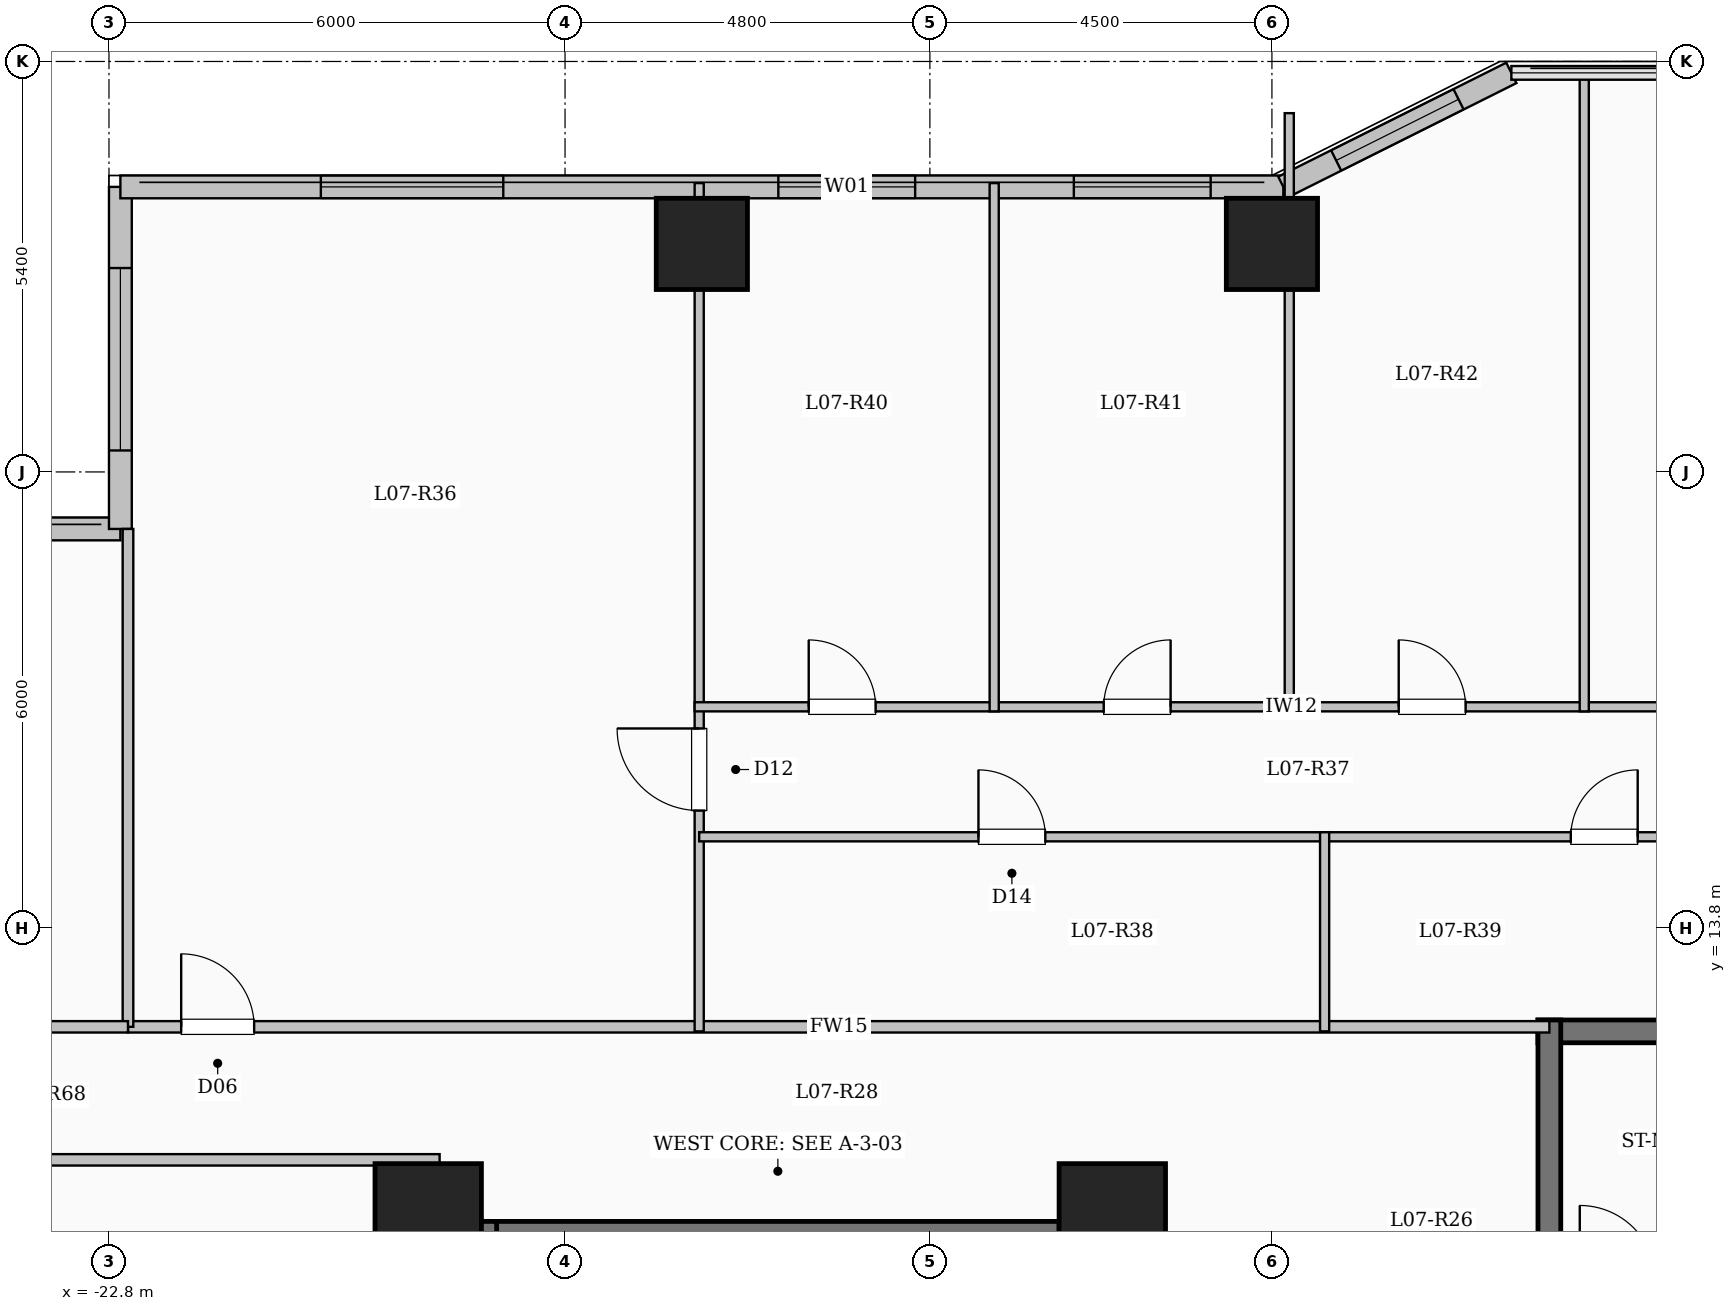
"""IFC4 building model, lengths in metres.
Left out: names, types, materials, properties, quantities, classifications, styles, units other than length and angle.
Written with IfcOpenShell. Run it as: python <this file> out.ifc"""

import sys

from ifc_helpers import new_model, si_unit, direction, frame, frame_2d, origin, origin_2d, place, context, subcontext, project, spatial, rectangle, extrude, element, fill, save


model = new_model("IFC4")
c1 = context("Model", 3, precision=1e-05, world=origin(), true_north=direction((0.0, 1.0)))
c2 = subcontext(c1, "Body", "Model", "MODEL_VIEW")
j1 = project(units=[si_unit("LENGTHUNIT", "METRE"), si_unit("PLANEANGLEUNIT", "RADIAN")], contexts=[c1])
p1 = place(None, origin())
s1 = spatial("IfcSite", under=j1, at=p1, CompositionType="ELEMENT")
p2 = place(p1, origin())
s2 = spatial("IfcBuilding", under=s1, at=p2, CompositionType="ELEMENT")
p3 = place(p2, frame((0.0, 0.0, 30.7)))
s3 = spatial("IfcBuildingStorey", under=s2, at=p3, CompositionType="ELEMENT", Elevation=30.7)
for number, where, z_axis, x_axis in (
    (1, (-9.6, 10.0, 0.0), (0.0, 0.0, 1.0), (1.0, 0.0, 0.0)),
    (2, (-18.6, 10.0, 0.0), (0.0, 0.0, 1.0), (1.0, 0.0, 0.0)),
):
    element("IfcColumn", number, at=place(p3, frame(where, z_axis=z_axis, x_axis=x_axis)), inside=s3, PredefinedType="COLUMN", context=c2, shape_type="SweptSolid", body=[
        extrude(rectangle(XDim=1.4, YDim=1.4, at=origin_2d()), origin(), (0.0, 0.0, 1.0), 3.35),
    ])
for number, where, z_axis, x_axis in (
    (3, (-15.0, 22.8, 0.0), (0.0, 0.0, 1.0), (1.0, 0.0, 0.0)),
    (4, (-7.5, 22.8, 0.0), (0.0, 0.0, 1.0), (1.0, 0.0, 0.0)),
):
    element("IfcColumn", number, at=place(p3, frame(where, z_axis=z_axis, x_axis=x_axis)), inside=s3, PredefinedType="COLUMN", context=c2, shape_type="SweptSolid", body=[
        extrude(rectangle(XDim=1.2, YDim=1.2, at=origin_2d()), origin(), (0.0, 0.0, 1.0), 3.35),
    ])
p4 = place(p3, frame((-28.65, 19.05, 0.0), z_axis=(0.0, 0.0, 1.0), x_axis=(1.0, 0.0, 0.0)))
e5 = element("IfcWall", 5, at=p4, inside=s3, PredefinedType="SOLIDWALL", context=c2, shape_type="SweptSolid", body=[
    extrude(rectangle(XDim=6.0, YDim=0.3, at=frame_2d((3.0, 0.0))), origin(), (0.0, 0.0, 1.0), 3.1),
])
p5 = place(p4, frame((2.025, 0.0, 0.9)))
e6 = element("IfcOpeningElement", 6, at=p5, cuts=e5, PredefinedType="OPENING", context=c2, shape_type="SweptSolid", body=[
    extrude(rectangle(XDim=2.0, YDim=1.7, at=frame_2d((1.0, 0.85))), frame((0.0, 0.16, 0.0), z_axis=(0.0, -1.0, 0.0), x_axis=(1.0, 0.0, 0.0)), (0.0, 0.0, 1.0), 0.32),
])
p6 = place(p3, frame((-22.65, 19.05, 0.0), z_axis=(0.0, 0.0, 1.0), x_axis=(0.0, 1.0, 0.0)))
e7 = element("IfcWall", 7, at=p6, inside=s3, PredefinedType="SOLIDWALL", context=c2, shape_type="SweptSolid", body=[
    extrude(rectangle(XDim=4.5, YDim=0.3, at=frame_2d((2.25, 0.0))), origin(), (0.0, 0.0, 1.0), 3.1),
])
p7 = place(p6, frame((1.032, 0.0, 0.9)))
e8 = element("IfcOpeningElement", 8, at=p7, cuts=e7, PredefinedType="OPENING", context=c2, shape_type="SweptSolid", body=[
    extrude(rectangle(XDim=2.4, YDim=1.8, at=frame_2d((1.2, 0.9))), frame((0.0, 0.16, 0.0), z_axis=(0.0, -1.0, 0.0), x_axis=(1.0, 0.0, 0.0)), (0.0, 0.0, 1.0), 0.32),
])
p8 = place(p3, frame((-22.65, 23.55, 0.0), z_axis=(0.0, 0.0, 1.0), x_axis=(1.0, 0.0, 0.0)))
e9 = element("IfcWall", 9, at=p8, inside=s3, PredefinedType="SOLIDWALL", context=c2, shape_type="SweptSolid", body=[
    extrude(rectangle(XDim=15.3, YDim=0.3, at=frame_2d((7.65, 0.0))), origin(), (0.0, 0.0, 1.0), 3.1),
])
p9 = place(p8, frame((2.637, 0.0, 0.9)))
e10 = element("IfcOpeningElement", 10, at=p9, cuts=e9, PredefinedType="OPENING", context=c2, shape_type="SweptSolid", body=[
    extrude(rectangle(XDim=2.4, YDim=1.8, at=frame_2d((1.2, 0.9))), frame((0.0, 0.16, 0.0), z_axis=(0.0, -1.0, 0.0), x_axis=(1.0, 0.0, 0.0)), (0.0, 0.0, 1.0), 0.32),
])
p10 = place(p8, frame((8.656, 0.0, 0.9)))
e11 = element("IfcOpeningElement", 11, at=p10, cuts=e9, PredefinedType="OPENING", context=c2, shape_type="SweptSolid", body=[
    extrude(rectangle(XDim=1.8, YDim=1.65, at=frame_2d((0.9, 0.825))), frame((0.0, 0.16, 0.0), z_axis=(0.0, -1.0, 0.0), x_axis=(1.0, 0.0, 0.0)), (0.0, 0.0, 1.0), 0.32),
])
p11 = place(p8, frame((12.544, 0.0, 0.9)))
e12 = element("IfcOpeningElement", 12, at=p11, cuts=e9, PredefinedType="OPENING", context=c2, shape_type="SweptSolid", body=[
    extrude(rectangle(XDim=1.8, YDim=1.65, at=frame_2d((0.9, 0.825))), frame((0.0, 0.16, 0.0), z_axis=(0.0, -1.0, 0.0), x_axis=(1.0, 0.0, 0.0)), (0.0, 0.0, 1.0), 0.32),
])
p12 = place(p3, frame((-7.35, 23.55, 0.0), z_axis=(0.0, 0.0, 1.0), x_axis=(0.894427191, 0.4472135955, 0.0)))
e13 = element("IfcWall", 13, at=p12, inside=s3, PredefinedType="SOLIDWALL", context=c2, shape_type="SweptSolid", body=[
    extrude(rectangle(XDim=3.354, YDim=0.3, at=frame_2d((1.677, 0.0))), origin(), (0.0, 0.0, 1.0), 3.1),
])
p13 = place(p12, frame((0.777, 0.0, 0.9)))
e14 = element("IfcOpeningElement", 14, at=p13, cuts=e13, PredefinedType="OPENING", context=c2, shape_type="SweptSolid", body=[
    extrude(rectangle(XDim=1.8, YDim=1.65, at=frame_2d((0.9, 0.825))), frame((0.0, 0.16, 0.0), z_axis=(0.0, -1.0, 0.0), x_axis=(1.0, 0.0, 0.0)), (0.0, 0.0, 1.0), 0.32),
])
p14 = place(p3, frame((-18.0, 9.79, 0.0), z_axis=(0.0, 0.0, 1.0), x_axis=(1.0, 0.0, 0.0)))
e15 = element("IfcWall", 15, at=p14, inside=s3, PredefinedType="SHEAR", context=c2, shape_type="SweptSolid", body=[
    extrude(rectangle(XDim=8.0, YDim=0.3, at=frame_2d((4.0, 0.0))), origin(), (0.0, 0.0, 1.0), 3.35),
])
for number, where, z_axis, x_axis in (
    (16, (-17.85, 6.35, 0.0), (0.0, 0.0, 1.0), (0.0, 1.0, 0.0)),
    (17, (-10.15, 6.35, 0.0), (0.0, 0.0, 1.0), (0.0, 1.0, 0.0)),
):
    element("IfcWall", number, at=place(p3, frame(where, z_axis=z_axis, x_axis=x_axis)), inside=s3, PredefinedType="SHEAR", context=c2, shape_type="SweptSolid", body=[
        extrude(rectangle(XDim=3.59, YDim=0.3, at=frame_2d((1.795, 0.0))), origin(), (0.0, 0.0, 1.0), 3.35),
    ])
p15 = place(p3, frame((-4.0, 12.44, 0.0), z_axis=(0.0, 0.0, 1.0), x_axis=(1.0, 0.0, 0.0)))
e18 = element("IfcWall", 18, at=p15, inside=s3, PredefinedType="SHEAR", context=c2, shape_type="SweptSolid", body=[
    extrude(rectangle(XDim=8.0, YDim=0.3, at=frame_2d((4.0, 0.0))), origin(), (0.0, 0.0, 1.0), 3.35),
])
p16 = place(p3, frame((-3.85, 9.0, 0.0), z_axis=(0.0, 0.0, 1.0), x_axis=(0.0, 1.0, 0.0)))
e19 = element("IfcWall", 19, at=p16, inside=s3, PredefinedType="SHEAR", context=c2, shape_type="SweptSolid", body=[
    extrude(rectangle(XDim=3.59, YDim=0.3, at=frame_2d((1.795, 0.0))), origin(), (0.0, 0.0, 1.0), 3.35),
])
p17 = place(p3, frame((-22.55, 12.5, 0.0), z_axis=(0.0, 0.0, 1.0), x_axis=(1.0, 0.0, 0.0)))
e20 = element("IfcWall", 20, at=p17, inside=s3, PredefinedType="PARTITIONING", context=c2, shape_type="SweptSolid", body=[
    extrude(rectangle(XDim=18.7, YDim=0.15, at=frame_2d((9.35, 0.0))), origin(), (0.0, 0.0, 1.0), 3.1),
])
p18 = place(p17, frame((0.7, 0.0, 0.0)))
e21 = element("IfcOpeningElement", 21, at=p18, cuts=e20, PredefinedType="OPENING", context=c2, shape_type="SweptSolid", body=[
    extrude(rectangle(XDim=0.96, YDim=2.15, at=frame_2d((0.48, 1.075))), frame((0.0, 0.085, 0.0), z_axis=(0.0, -1.0, 0.0), x_axis=(1.0, 0.0, 0.0)), (0.0, 0.0, 1.0), 0.17),
])
p19 = place(p3, frame((-15.035, 12.44, 0.0), z_axis=(0.0, 0.0, 1.0), x_axis=(0.0, 1.0, 0.0)))
e22 = element("IfcWall", 22, at=p19, inside=s3, PredefinedType="PARTITIONING", context=c2, shape_type="SweptSolid", body=[
    extrude(rectangle(XDim=11.16, YDim=0.12, at=frame_2d((5.58, 0.0))), origin(), (0.0, 0.0, 1.0), 2.435),
])
p20 = place(p19, frame((2.905, 0.0, 0.0)))
e23 = element("IfcOpeningElement", 23, at=p20, cuts=e22, PredefinedType="OPENING", context=c2, shape_type="SweptSolid", body=[
    extrude(rectangle(XDim=1.08, YDim=2.15, at=frame_2d((0.54, 1.075))), frame((0.0, 0.07, 0.0), z_axis=(0.0, -1.0, 0.0), x_axis=(1.0, 0.0, 0.0)), (0.0, 0.0, 1.0), 0.14),
])
p21 = place(p3, frame((-15.035, 15.0, 0.0), z_axis=(0.0, 0.0, 1.0), x_axis=(1.0, 0.0, 0.0)))
e24 = element("IfcWall", 24, at=p21, inside=s3, PredefinedType="PARTITIONING", context=c2, shape_type="SweptSolid", body=[
    extrude(rectangle(XDim=8.228, YDim=0.12, at=frame_2d((4.114, 0.0))), origin(), (0.0, 0.0, 1.0), 2.585),
])
p22 = place(p21, frame((3.674, 0.0, 0.0)))
e25 = element("IfcOpeningElement", 25, at=p22, cuts=e24, PredefinedType="OPENING", context=c2, shape_type="SweptSolid", body=[
    extrude(rectangle(XDim=0.88, YDim=2.1, at=frame_2d((0.44, 1.05))), frame((0.0, 0.07, 0.0), z_axis=(0.0, -1.0, 0.0), x_axis=(1.0, 0.0, 0.0)), (0.0, 0.0, 1.0), 0.14),
])
p23 = place(p3, frame((-6.807, 15.0, 0.0), z_axis=(0.0, 0.0, 1.0), x_axis=(1.0, 0.0, 0.0)))
e26 = element("IfcWall", 26, at=p23, inside=s3, PredefinedType="PARTITIONING", context=c2, shape_type="SweptSolid", body=[
    extrude(rectangle(XDim=7.357, YDim=0.12, at=frame_2d((3.678, 0.0))), origin(), (0.0, 0.0, 1.0), 2.585),
])
p24 = place(p23, frame((3.239, 0.0, 0.0)))
e27 = element("IfcOpeningElement", 27, at=p24, cuts=e26, PredefinedType="OPENING", context=c2, shape_type="SweptSolid", body=[
    extrude(rectangle(XDim=0.88, YDim=2.1, at=frame_2d((0.44, 1.05))), frame((0.0, 0.07, 0.0), z_axis=(0.0, -1.0, 0.0), x_axis=(1.0, 0.0, 0.0)), (0.0, 0.0, 1.0), 0.14),
])
p25 = place(p3, frame((-15.095, 16.71, 0.0), z_axis=(0.0, 0.0, 1.0), x_axis=(1.0, 0.0, 0.0)))
e28 = element("IfcWall", 28, at=p25, inside=s3, PredefinedType="PARTITIONING", context=c2, shape_type="SweptSolid", body=[
    extrude(rectangle(XDim=15.705, YDim=0.12, at=frame_2d((7.853, 0.0))), origin(), (0.0, 0.0, 1.0), 2.585),
])
p26 = place(p25, frame((1.501, 0.0, 0.0)))
e29 = element("IfcOpeningElement", 29, at=p26, cuts=e28, PredefinedType="OPENING", context=c2, shape_type="SweptSolid", body=[
    extrude(rectangle(XDim=0.88, YDim=2.1, at=frame_2d((0.44, 1.05))), frame((0.0, 0.07, 0.0), z_axis=(0.0, -1.0, 0.0), x_axis=(1.0, 0.0, 0.0)), (0.0, 0.0, 1.0), 0.14),
])
p27 = place(p25, frame((5.382, 0.0, 0.0)))
e30 = element("IfcOpeningElement", 30, at=p27, cuts=e28, PredefinedType="OPENING", context=c2, shape_type="SweptSolid", body=[
    extrude(rectangle(XDim=0.88, YDim=2.1, at=frame_2d((0.44, 1.05))), frame((0.0, 0.07, 0.0), z_axis=(0.0, -1.0, 0.0), x_axis=(1.0, 0.0, 0.0)), (0.0, 0.0, 1.0), 0.14),
])
p28 = place(p25, frame((9.263, 0.0, 0.0)))
e31 = element("IfcOpeningElement", 31, at=p28, cuts=e28, PredefinedType="OPENING", context=c2, shape_type="SweptSolid", body=[
    extrude(rectangle(XDim=0.88, YDim=2.1, at=frame_2d((0.44, 1.05))), frame((0.0, 0.07, 0.0), z_axis=(0.0, -1.0, 0.0), x_axis=(1.0, 0.0, 0.0)), (0.0, 0.0, 1.0), 0.14),
])
p29 = place(p25, frame((13.144, 0.0, 0.0)))
e32 = element("IfcOpeningElement", 32, at=p29, cuts=e28, PredefinedType="OPENING", context=c2, shape_type="SweptSolid", body=[
    extrude(rectangle(XDim=0.88, YDim=2.1, at=frame_2d((0.44, 1.05))), frame((0.0, 0.07, 0.0), z_axis=(0.0, -1.0, 0.0), x_axis=(1.0, 0.0, 0.0)), (0.0, 0.0, 1.0), 0.14),
])
p30 = place(p3, frame((-6.807, 12.44, 0.0), z_axis=(0.0, 0.0, 1.0), x_axis=(0.0, 1.0, 0.0)))
e33 = element("IfcWall", 33, at=p30, inside=s3, PredefinedType="PARTITIONING", context=c2, shape_type="SweptSolid", body=[
    extrude(rectangle(XDim=2.62, YDim=0.12, at=frame_2d((1.31, 0.0))), origin(), (0.0, 0.0, 1.0), 3.1),
])
p31 = place(p3, frame((-11.154, 16.65, 0.0), z_axis=(0.0, 0.0, 1.0), x_axis=(0.0, 1.0, 0.0)))
e34 = element("IfcWall", 34, at=p31, inside=s3, PredefinedType="PARTITIONING", context=c2, shape_type="SweptSolid", body=[
    extrude(rectangle(XDim=6.95, YDim=0.12, at=frame_2d((3.475, 0.0))), origin(), (0.0, 0.0, 1.0), 3.1),
])
p32 = place(p3, frame((-7.272, 16.65, 0.0), z_axis=(0.0, 0.0, 1.0), x_axis=(0.0, 1.0, 0.0)))
e35 = element("IfcWall", 35, at=p32, inside=s3, PredefinedType="PARTITIONING", context=c2, shape_type="SweptSolid", body=[
    extrude(rectangle(XDim=7.87, YDim=0.12, at=frame_2d((3.935, 0.0))), origin(), (0.0, 0.0, 1.0), 2.435),
])
p33 = place(p3, frame((-3.391, 16.65, 0.0), z_axis=(0.0, 0.0, 1.0), x_axis=(0.0, 1.0, 0.0)))
e36 = element("IfcWall", 36, at=p33, inside=s3, PredefinedType="PARTITIONING", context=c2, shape_type="SweptSolid", body=[
    extrude(rectangle(XDim=8.43, YDim=0.12, at=frame_2d((4.215, 0.0))), origin(), (0.0, 0.0, 1.0), 3.1),
])
p34 = place(p3, frame((-28.68, 10.75, 0.0), z_axis=(0.0, 0.0, 1.0), x_axis=(1.0, 0.0, 0.0)))
e37 = element("IfcWall", 37, at=p34, inside=s3, PredefinedType="PARTITIONING", context=c2, shape_type="SweptSolid", body=[
    extrude(rectangle(XDim=10.23, YDim=0.15, at=frame_2d((5.115, 0.0))), origin(), (0.0, 0.0, 1.0), 3.1),
])
p35 = place(p3, frame((-22.55, 12.5, 0.0), z_axis=(0.0, 0.0, 1.0), x_axis=(0.0, 1.0, 0.0)))
e38 = element("IfcWall", 38, at=p35, inside=s3, PredefinedType="PARTITIONING", context=c2, shape_type="SweptSolid", body=[
    extrude(rectangle(XDim=6.55, YDim=0.14, at=frame_2d((3.275, 0.0))), origin(), (0.0, 0.0, 1.0), 3.1),
])
p36 = place(p3, frame((-28.68, 12.5, 0.0), z_axis=(0.0, 0.0, 1.0), x_axis=(1.0, 0.0, 0.0)))
e39 = element("IfcWall", 39, at=p36, inside=s3, PredefinedType="PARTITIONING", context=c2, shape_type="SweptSolid", body=[
    extrude(rectangle(XDim=6.13, YDim=0.15, at=frame_2d((3.065, 0.0))), origin(), (0.0, 0.0, 1.0), 3.1),
])
p37 = place(p36, frame((2.59, 0.0, 0.0)))
e40 = element("IfcOpeningElement", 40, at=p37, cuts=e39, PredefinedType="OPENING", context=c2, shape_type="SweptSolid", body=[
    extrude(rectangle(XDim=0.95, YDim=2.15, at=frame_2d((0.475, 1.075))), frame((0.0, 0.085, 0.0), z_axis=(0.0, -1.0, 0.0), x_axis=(1.0, 0.0, 0.0)), (0.0, 0.0, 1.0), 0.17),
])
p38 = place(p7, origin())
e41 = element("IfcWindow", 41, at=p38, inside=s3, PartitioningType="SINGLE_PANEL", PredefinedType="WINDOW", context=c2, shape_type="SweptSolid", body=[
    extrude(rectangle(XDim=2.4, YDim=1.8, at=frame_2d((1.2, 0.9))), frame((0.0, 0.03, 0.0), z_axis=(0.0, -1.0, 0.0), x_axis=(1.0, 0.0, 0.0)), (0.0, 0.0, 1.0), 0.06),
])
fill(e8, e41)
p39 = place(p9, origin())
e42 = element("IfcWindow", 42, at=p39, inside=s3, PartitioningType="SINGLE_PANEL", PredefinedType="WINDOW", context=c2, shape_type="SweptSolid", body=[
    extrude(rectangle(XDim=2.4, YDim=1.8, at=frame_2d((1.2, 0.9))), frame((0.0, 0.03, 0.0), z_axis=(0.0, -1.0, 0.0), x_axis=(1.0, 0.0, 0.0)), (0.0, 0.0, 1.0), 0.06),
])
fill(e10, e42)
p40 = place(p10, origin())
e43 = element("IfcWindow", 43, at=p40, inside=s3, PartitioningType="SINGLE_PANEL", PredefinedType="WINDOW", context=c2, shape_type="SweptSolid", body=[
    extrude(rectangle(XDim=1.8, YDim=1.65, at=frame_2d((0.9, 0.825))), frame((0.0, 0.03, 0.0), z_axis=(0.0, -1.0, 0.0), x_axis=(1.0, 0.0, 0.0)), (0.0, 0.0, 1.0), 0.06),
])
fill(e11, e43)
p41 = place(p11, origin())
e44 = element("IfcWindow", 44, at=p41, inside=s3, PartitioningType="SINGLE_PANEL", PredefinedType="WINDOW", context=c2, shape_type="SweptSolid", body=[
    extrude(rectangle(XDim=1.8, YDim=1.65, at=frame_2d((0.9, 0.825))), frame((0.0, 0.03, 0.0), z_axis=(0.0, -1.0, 0.0), x_axis=(1.0, 0.0, 0.0)), (0.0, 0.0, 1.0), 0.06),
])
fill(e12, e44)
p42 = place(p13, origin())
e45 = element("IfcWindow", 45, at=p42, inside=s3, PartitioningType="SINGLE_PANEL", PredefinedType="WINDOW", context=c2, shape_type="SweptSolid", body=[
    extrude(rectangle(XDim=1.8, YDim=1.65, at=frame_2d((0.9, 0.825))), frame((0.0, 0.03, 0.0), z_axis=(0.0, -1.0, 0.0), x_axis=(1.0, 0.0, 0.0)), (0.0, 0.0, 1.0), 0.06),
])
fill(e14, e45)
p43 = place(p18, origin())
e46 = element("IfcDoor", 46, at=p43, inside=s3, OperationType="SINGLE_SWING_LEFT", PredefinedType="DOOR", context=c2, shape_type="SweptSolid", body=[
    extrude(rectangle(XDim=0.96, YDim=2.15, at=frame_2d((0.48, 1.075))), frame((0.0, 0.025, 0.0), z_axis=(0.0, -1.0, 0.0), x_axis=(1.0, 0.0, 0.0)), (0.0, 0.0, 1.0), 0.05),
])
fill(e21, e46)
p44 = place(p20, origin())
e47 = element("IfcDoor", 47, at=p44, inside=s3, OperationType="SINGLE_SWING_RIGHT", PredefinedType="DOOR", context=c2, shape_type="SweptSolid", body=[
    extrude(rectangle(XDim=1.08, YDim=2.15, at=frame_2d((0.54, 1.075))), frame((0.0, 0.025, 0.0), z_axis=(0.0, -1.0, 0.0), x_axis=(1.0, 0.0, 0.0)), (0.0, 0.0, 1.0), 0.05),
])
fill(e23, e47)
p45 = place(p22, origin())
e48 = element("IfcDoor", 48, at=p45, inside=s3, OperationType="SINGLE_SWING_LEFT", PredefinedType="DOOR", context=c2, shape_type="SweptSolid", body=[
    extrude(rectangle(XDim=0.88, YDim=2.1, at=frame_2d((0.44, 1.05))), frame((0.0, 0.025, 0.0), z_axis=(0.0, -1.0, 0.0), x_axis=(1.0, 0.0, 0.0)), (0.0, 0.0, 1.0), 0.05),
])
fill(e25, e48)
p46 = place(p24, origin())
e49 = element("IfcDoor", 49, at=p46, inside=s3, OperationType="SINGLE_SWING_RIGHT", PredefinedType="DOOR", context=c2, shape_type="SweptSolid", body=[
    extrude(rectangle(XDim=0.88, YDim=2.1, at=frame_2d((0.44, 1.05))), frame((0.0, 0.025, 0.0), z_axis=(0.0, -1.0, 0.0), x_axis=(1.0, 0.0, 0.0)), (0.0, 0.0, 1.0), 0.05),
])
fill(e27, e49)
p47 = place(p26, origin())
e50 = element("IfcDoor", 50, at=p47, inside=s3, OperationType="SINGLE_SWING_LEFT", PredefinedType="DOOR", context=c2, shape_type="SweptSolid", body=[
    extrude(rectangle(XDim=0.88, YDim=2.1, at=frame_2d((0.44, 1.05))), frame((0.0, 0.025, 0.0), z_axis=(0.0, -1.0, 0.0), x_axis=(1.0, 0.0, 0.0)), (0.0, 0.0, 1.0), 0.05),
])
fill(e29, e50)
p48 = place(p27, origin())
e51 = element("IfcDoor", 51, at=p48, inside=s3, OperationType="SINGLE_SWING_RIGHT", PredefinedType="DOOR", context=c2, shape_type="SweptSolid", body=[
    extrude(rectangle(XDim=0.88, YDim=2.1, at=frame_2d((0.44, 1.05))), frame((0.0, 0.025, 0.0), z_axis=(0.0, -1.0, 0.0), x_axis=(1.0, 0.0, 0.0)), (0.0, 0.0, 1.0), 0.05),
])
fill(e30, e51)
p49 = place(p28, origin())
e52 = element("IfcDoor", 52, at=p49, inside=s3, OperationType="SINGLE_SWING_LEFT", PredefinedType="DOOR", context=c2, shape_type="SweptSolid", body=[
    extrude(rectangle(XDim=0.88, YDim=2.1, at=frame_2d((0.44, 1.05))), frame((0.0, 0.025, 0.0), z_axis=(0.0, -1.0, 0.0), x_axis=(1.0, 0.0, 0.0)), (0.0, 0.0, 1.0), 0.05),
])
fill(e31, e52)
save(model, sys.argv[1])
